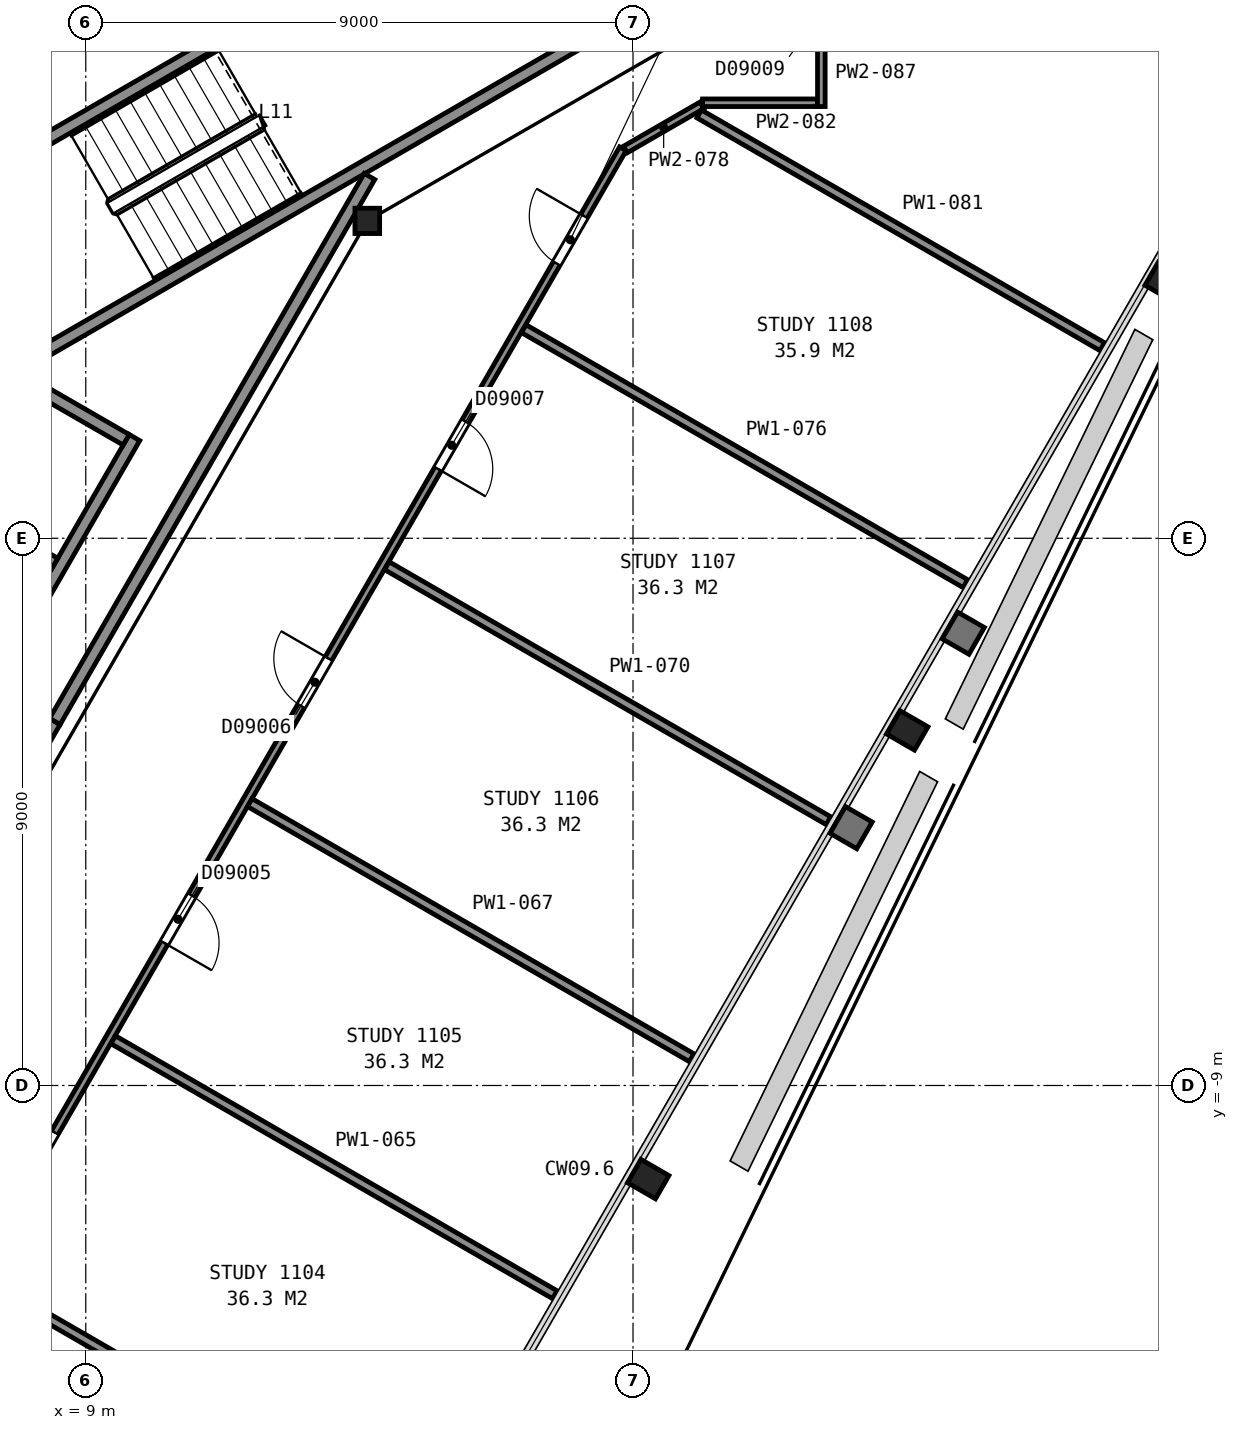
"""IFC4 building model, lengths in metres.
Left out: names, types, materials, properties, quantities, classifications, styles, units other than length and angle.
Written with IfcOpenShell. Run it as: python <this file> out.ifc"""

import sys

from ifc_helpers import new_model, si_unit, direction, frame, frame_2d, origin, origin_2d, place, context, subcontext, project, spatial, rectangle, i_section, extrude, element, fill, save


model = new_model("IFC4")
c1 = context("Model", 3, precision=1e-05, world=origin(), true_north=direction((0.0, 1.0)))
c2 = subcontext(c1, "Body", "Model", "MODEL_VIEW")
j1 = project(units=[si_unit("LENGTHUNIT", "METRE"), si_unit("PLANEANGLEUNIT", "RADIAN")], contexts=[c1])
p1 = place(None, origin())
s1 = spatial("IfcSite", under=j1, at=p1, CompositionType="ELEMENT")
p2 = place(p1, origin())
s2 = spatial("IfcBuilding", under=s1, at=p2, CompositionType="ELEMENT")
p3 = place(p2, frame((0.0, 0.0, 54.8)))
s3 = spatial("IfcBuildingStorey", under=s2, at=p3, CompositionType="ELEMENT", Elevation=54.8)
for number, where, z_axis, x_axis in (
    (1, (18.25, -10.54, 0.0), (0.0, 0.0, 1.0), (-0.5, -0.866, 0.0)),
    (2, (22.51, -3.16, 0.0), (0.0, 0.0, 1.0), (-0.5, -0.866, 0.0)),
    (3, (26.76, 4.22, 0.0), (0.0, 0.0, 1.0), (-0.5, -0.866, 0.0)),
):
    element("IfcColumn", number, at=place(p3, frame(where, z_axis=z_axis, x_axis=x_axis)), inside=s3, PredefinedType="COLUMN", context=c2, shape_type="SweptSolid", body=[
        extrude(i_section(OverallWidth=0.442, OverallDepth=0.531, WebThickness=0.066, FlangeThickness=0.106, FilletRadius=0.015, at=origin_2d()), origin(), (0.0, 0.0, 1.0), 3.6),
    ])
p4 = place(p3, frame((13.63, 5.22, 0.0), z_axis=(0.0, 0.0, 1.0), x_axis=(1.0, 0.0, 0.0)))
e4 = element("IfcColumn", 4, at=p4, inside=s3, PredefinedType="COLUMN", context=c2, shape_type="SweptSolid", body=[
    extrude(i_section(OverallWidth=0.406, OverallDepth=0.417, WebThickness=0.03, FlangeThickness=0.048, FilletRadius=0.015, at=origin_2d()), origin(), (0.0, 0.0, 1.0), 3.6),
])
for number, where, z_axis, x_axis in (
    (5, (6.178, 5.299, 0.0), (0.0, 0.0, 1.0), (0.866, 0.5, 0.0)),
    (6, (7.678, 2.701, 0.0), (0.0, 0.0, 1.0), (0.866, 0.5, 0.0)),
):
    element("IfcWall", number, at=place(p3, frame(where, z_axis=z_axis, x_axis=x_axis)), inside=s3, PredefinedType="PARTITIONING", context=c2, shape_type="SweptSolid", body=[
        extrude(rectangle(XDim=12.0, YDim=0.2, at=frame_2d((6.0, 0.0))), origin(), (0.0, 0.0, 1.0), 3.35),
    ])
p5 = place(p3, frame((7.216, -5.222, 0.0), z_axis=(0.0, 0.0, 1.0), x_axis=(0.499990435942, 0.866030925526, 0.0)))
e7 = element("IfcWall", 7, at=p5, inside=s3, PredefinedType="PARTITIONING", context=c2, shape_type="SweptSolid", body=[
    extrude(rectangle(XDim=2.55, YDim=0.2, at=frame_2d((1.275, 0.0))), origin(), (0.0, 0.0, 1.0), 3.6),
])
p6 = place(p3, frame((7.451, -2.414, 0.0), z_axis=(0.0, 0.0, 1.0), x_axis=(0.500016218704, 0.866016039709, 0.0)))
e8 = element("IfcWall", 8, at=p6, inside=s3, PredefinedType="PARTITIONING", context=c2, shape_type="SweptSolid", body=[
    extrude(rectangle(XDim=4.7, YDim=0.2, at=frame_2d((2.35, 0.0))), origin(), (0.0, 0.0, 1.0), 3.6),
])
p7 = place(p3, frame((9.665, 1.62, 0.0), z_axis=(0.0, 0.0, 1.0), x_axis=(-0.866002029911, 0.500040482552, 0.0)))
e9 = element("IfcWall", 9, at=p7, inside=s3, PredefinedType="PARTITIONING", context=c2, shape_type="SweptSolid", body=[
    extrude(rectangle(XDim=1.75, YDim=0.2, at=frame_2d((0.875, 0.0))), origin(), (0.0, 0.0, 1.0), 3.6),
])
p8 = place(p3, frame((8.49, -0.416, 0.0), z_axis=(0.0, 0.0, 1.0), x_axis=(-0.866036909293, 0.499980071345, 0.0)))
e10 = element("IfcWall", 10, at=p8, inside=s3, PredefinedType="PARTITIONING", context=c2, shape_type="SweptSolid", body=[
    extrude(rectangle(XDim=1.75, YDim=0.2, at=frame_2d((0.875, 0.0))), origin(), (0.0, 0.0, 1.0), 3.6),
])
p9 = place(p3, frame((8.492, -3.012, 0.0), z_axis=(0.0, 0.0, 1.0), x_axis=(0.499972957231, 0.866041016371, 0.0)))
e11 = element("IfcWall", 11, at=p9, inside=s3, PredefinedType="PARTITIONING", context=c2, shape_type="SweptSolid", body=[
    extrude(rectangle(XDim=10.349, YDim=0.2, at=frame_2d((5.174, 0.0))), origin(), (0.0, 0.0, 1.0), 3.35),
])
p10 = place(p3, frame((17.833, 6.406, 0.0), z_axis=(0.0, 0.0, 1.0), x_axis=(-0.500002884005, -0.866023738697, 0.0)))
e12 = element("IfcWall", 12, at=p10, inside=s3, PredefinedType="PARTITIONING", context=c2, shape_type="SweptSolid", body=[
    extrude(rectangle(XDim=28.135, YDim=0.125, at=frame_2d((14.067, 0.0))), origin(), (0.0, 0.0, 1.0), 2.613),
])
p11 = place(p10, frame((26.522, 0.0, 0.0)))
e13 = element("IfcOpeningElement", 13, at=p11, cuts=e12, PredefinedType="OPENING", context=c2, shape_type="SweptSolid", body=[
    extrude(rectangle(XDim=0.9, YDim=2.1, at=frame_2d((0.45, 1.05))), frame((0.0, 0.073, 0.0), z_axis=(0.0, -1.0, 0.0), x_axis=(1.0, 0.0, 0.0)), (0.0, 0.0, 1.0), 0.145),
])
p12 = place(p10, frame((23.184, 0.0, 0.0)))
e14 = element("IfcOpeningElement", 14, at=p12, cuts=e12, PredefinedType="OPENING", context=c2, shape_type="SweptSolid", body=[
    extrude(rectangle(XDim=0.9, YDim=2.1, at=frame_2d((0.45, 1.05))), frame((0.0, 0.073, 0.0), z_axis=(0.0, -1.0, 0.0), x_axis=(1.0, 0.0, 0.0)), (0.0, 0.0, 1.0), 0.145),
])
p13 = place(p10, frame((18.683, 0.0, 0.0)))
e15 = element("IfcOpeningElement", 15, at=p13, cuts=e12, PredefinedType="OPENING", context=c2, shape_type="SweptSolid", body=[
    extrude(rectangle(XDim=0.9, YDim=2.1, at=frame_2d((0.45, 1.05))), frame((0.0, 0.073, 0.0), z_axis=(0.0, -1.0, 0.0), x_axis=(1.0, 0.0, 0.0)), (0.0, 0.0, 1.0), 0.145),
])
p14 = place(p10, frame((14.182, 0.0, 0.0)))
e16 = element("IfcOpeningElement", 16, at=p14, cuts=e12, PredefinedType="OPENING", context=c2, shape_type="SweptSolid", body=[
    extrude(rectangle(XDim=0.9, YDim=2.1, at=frame_2d((0.45, 1.05))), frame((0.0, 0.073, 0.0), z_axis=(0.0, -1.0, 0.0), x_axis=(1.0, 0.0, 0.0)), (0.0, 0.0, 1.0), 0.145),
])
p15 = place(p10, frame((9.681, 0.0, 0.0)))
e17 = element("IfcOpeningElement", 17, at=p15, cuts=e12, PredefinedType="OPENING", context=c2, shape_type="SweptSolid", body=[
    extrude(rectangle(XDim=0.9, YDim=2.1, at=frame_2d((0.45, 1.05))), frame((0.0, 0.073, 0.0), z_axis=(0.0, -1.0, 0.0), x_axis=(1.0, 0.0, 0.0)), (0.0, 0.0, 1.0), 0.145),
])
p16 = place(p10, frame((5.18, 0.0, 0.0)))
e18 = element("IfcOpeningElement", 18, at=p16, cuts=e12, PredefinedType="OPENING", context=c2, shape_type="SweptSolid", body=[
    extrude(rectangle(XDim=0.9, YDim=2.1, at=frame_2d((0.45, 1.05))), frame((0.0, 0.073, 0.0), z_axis=(0.0, -1.0, 0.0), x_axis=(1.0, 0.0, 0.0)), (0.0, 0.0, 1.0), 0.145),
])
p17 = place(p10, frame((1.278, 0.0, 0.0)))
e19 = element("IfcOpeningElement", 19, at=p17, cuts=e12, PredefinedType="OPENING", context=c2, shape_type="SweptSolid", body=[
    extrude(rectangle(XDim=0.9, YDim=2.1, at=frame_2d((0.45, 1.05))), frame((0.0, 0.073, 0.0), z_axis=(0.0, -1.0, 0.0), x_axis=(1.0, 0.0, 0.0)), (0.0, 0.0, 1.0), 0.145),
])
p18 = place(p3, frame((7.196, -12.143, 0.0), z_axis=(0.0, 0.0, 1.0), x_axis=(0.866010672798, -0.500025513949, 0.0)))
e20 = element("IfcWall", 20, at=p18, inside=s3, PredefinedType="PARTITIONING", context=c2, shape_type="SweptSolid", body=[
    extrude(rectangle(XDim=8.391, YDim=0.15, at=frame_2d((4.196, 0.0))), origin(), (0.0, 0.0, 1.0), 2.613),
])
p19 = place(p3, frame((9.45, -8.248, 0.0), z_axis=(0.0, 0.0, 1.0), x_axis=(0.866040157966, -0.499974444137, 0.0)))
e21 = element("IfcWall", 21, at=p19, inside=s3, PredefinedType="PARTITIONING", context=c2, shape_type="SweptSolid", body=[
    extrude(rectangle(XDim=8.387, YDim=0.15, at=frame_2d((4.193, 0.0))), origin(), (0.0, 0.0, 1.0), 2.613),
])
p20 = place(p3, frame((11.697, -4.347, 0.0), z_axis=(0.0, 0.0, 1.0), x_axis=(0.866005348532, -0.500034735108, 0.0)))
e22 = element("IfcWall", 22, at=p20, inside=s3, PredefinedType="PARTITIONING", context=c2, shape_type="SweptSolid", body=[
    extrude(rectangle(XDim=8.392, YDim=0.15, at=frame_2d((4.196, 0.0))), origin(), (0.0, 0.0, 1.0), 2.613),
])
p21 = place(p3, frame((13.951, -0.452, 0.0), z_axis=(0.0, 0.0, 1.0), x_axis=(0.866027553047, -0.499996277349, 0.0)))
e23 = element("IfcWall", 23, at=p21, inside=s3, PredefinedType="PARTITIONING", context=c2, shape_type="SweptSolid", body=[
    extrude(rectangle(XDim=8.387, YDim=0.15, at=frame_2d((4.193, 0.0))), origin(), (0.0, 0.0, 1.0), 2.613),
])
p22 = place(p3, frame((16.202, 3.447, 0.0), z_axis=(0.0, 0.0, 1.0), x_axis=(0.866047434595, -0.499961839574, 0.0)))
e24 = element("IfcWall", 24, at=p22, inside=s3, PredefinedType="PARTITIONING", context=c2, shape_type="SweptSolid", body=[
    extrude(rectangle(XDim=8.387, YDim=0.15, at=frame_2d((4.193, 0.0))), origin(), (0.0, 0.0, 1.0), 2.613),
])
p23 = place(p3, frame((17.875, 6.395, 0.0), z_axis=(0.0, 0.0, 1.0), x_axis=(0.865894215669, 0.500227155672, 0.0)))
e25 = element("IfcWall", 25, at=p23, inside=s3, PredefinedType="PARTITIONING", context=c2, shape_type="SweptSolid", body=[
    extrude(rectangle(XDim=1.451, YDim=0.125, at=frame_2d((0.726, 0.0))), origin(), (0.0, 0.0, 1.0), 2.613),
])
p24 = place(p3, frame((19.088, 6.979, 0.0), z_axis=(0.0, 0.0, 1.0), x_axis=(0.865990629129, -0.500060226633, 0.0)))
e26 = element("IfcWall", 26, at=p24, inside=s3, PredefinedType="PARTITIONING", context=c2, shape_type="SweptSolid", body=[
    extrude(rectangle(XDim=7.654, YDim=0.15, at=frame_2d((3.827, 0.0))), origin(), (0.0, 0.0, 1.0), 2.613),
])
p25 = place(p3, frame((19.144, 7.163, 0.0), z_axis=(0.0, 0.0, 1.0), x_axis=(1.0, 0.0, 0.0)))
e27 = element("IfcWall", 27, at=p25, inside=s3, PredefinedType="PARTITIONING", context=c2, shape_type="SweptSolid", body=[
    extrude(rectangle(XDim=1.888, YDim=0.125, at=frame_2d((0.944, 0.0))), origin(), (0.0, 0.0, 1.0), 2.613),
])
p26 = place(p3, frame((21.097, 10.219, 0.0), z_axis=(0.0, 0.0, 1.0), x_axis=(0.0, -1.0, 0.0)))
e28 = element("IfcWall", 28, at=p26, inside=s3, PredefinedType="PARTITIONING", context=c2, shape_type="SweptSolid", body=[
    extrude(rectangle(XDim=3.119, YDim=0.125, at=frame_2d((1.56, 0.0))), origin(), (0.0, 0.0, 1.0), 2.613),
])
p27 = place(p26, frame((1.106, 0.0, 0.0)))
e29 = element("IfcOpeningElement", 29, at=p27, cuts=e28, PredefinedType="OPENING", context=c2, shape_type="SweptSolid", body=[
    extrude(rectangle(XDim=0.9, YDim=2.1, at=frame_2d((0.45, 1.05))), frame((0.0, 0.073, 0.0), z_axis=(0.0, -1.0, 0.0), x_axis=(1.0, 0.0, 0.0)), (0.0, 0.0, 1.0), 0.145),
])
p28 = place(p13, origin())
e30 = element("IfcDoor", 30, at=p28, inside=s3, OperationType="SINGLE_SWING_LEFT", PredefinedType="DOOR", context=c2, shape_type="SweptSolid", body=[
    extrude(rectangle(XDim=0.9, YDim=2.1, at=frame_2d((0.45, 1.05))), frame((0.0, 0.025, 0.0), z_axis=(0.0, -1.0, 0.0), x_axis=(1.0, 0.0, 0.0)), (0.0, 0.0, 1.0), 0.05),
])
fill(e15, e30)
p29 = place(p14, origin())
e31 = element("IfcDoor", 31, at=p29, inside=s3, OperationType="SINGLE_SWING_RIGHT", PredefinedType="DOOR", context=c2, shape_type="SweptSolid", body=[
    extrude(rectangle(XDim=0.9, YDim=2.1, at=frame_2d((0.45, 1.05))), frame((0.0, 0.025, 0.0), z_axis=(0.0, -1.0, 0.0), x_axis=(1.0, 0.0, 0.0)), (0.0, 0.0, 1.0), 0.05),
])
fill(e16, e31)
p30 = place(p15, origin())
e32 = element("IfcDoor", 32, at=p30, inside=s3, OperationType="SINGLE_SWING_LEFT", PredefinedType="DOOR", context=c2, shape_type="SweptSolid", body=[
    extrude(rectangle(XDim=0.9, YDim=2.1, at=frame_2d((0.45, 1.05))), frame((0.0, 0.025, 0.0), z_axis=(0.0, -1.0, 0.0), x_axis=(1.0, 0.0, 0.0)), (0.0, 0.0, 1.0), 0.05),
])
fill(e17, e32)
p31 = place(p16, origin())
e33 = element("IfcDoor", 33, at=p31, inside=s3, OperationType="SINGLE_SWING_RIGHT", PredefinedType="DOOR", context=c2, shape_type="SweptSolid", body=[
    extrude(rectangle(XDim=0.9, YDim=2.1, at=frame_2d((0.45, 1.05))), frame((0.0, 0.025, 0.0), z_axis=(0.0, -1.0, 0.0), x_axis=(1.0, 0.0, 0.0)), (0.0, 0.0, 1.0), 0.05),
])
fill(e18, e33)
p32 = place(p17, origin())
e34 = element("IfcDoor", 34, at=p32, inside=s3, OperationType="SINGLE_SWING_LEFT", PredefinedType="DOOR", context=c2, shape_type="SweptSolid", body=[
    extrude(rectangle(XDim=0.9, YDim=2.1, at=frame_2d((0.45, 1.05))), frame((0.0, 0.025, 0.0), z_axis=(0.0, -1.0, 0.0), x_axis=(1.0, 0.0, 0.0)), (0.0, 0.0, 1.0), 0.05),
])
fill(e19, e34)
save(model, sys.argv[1])
